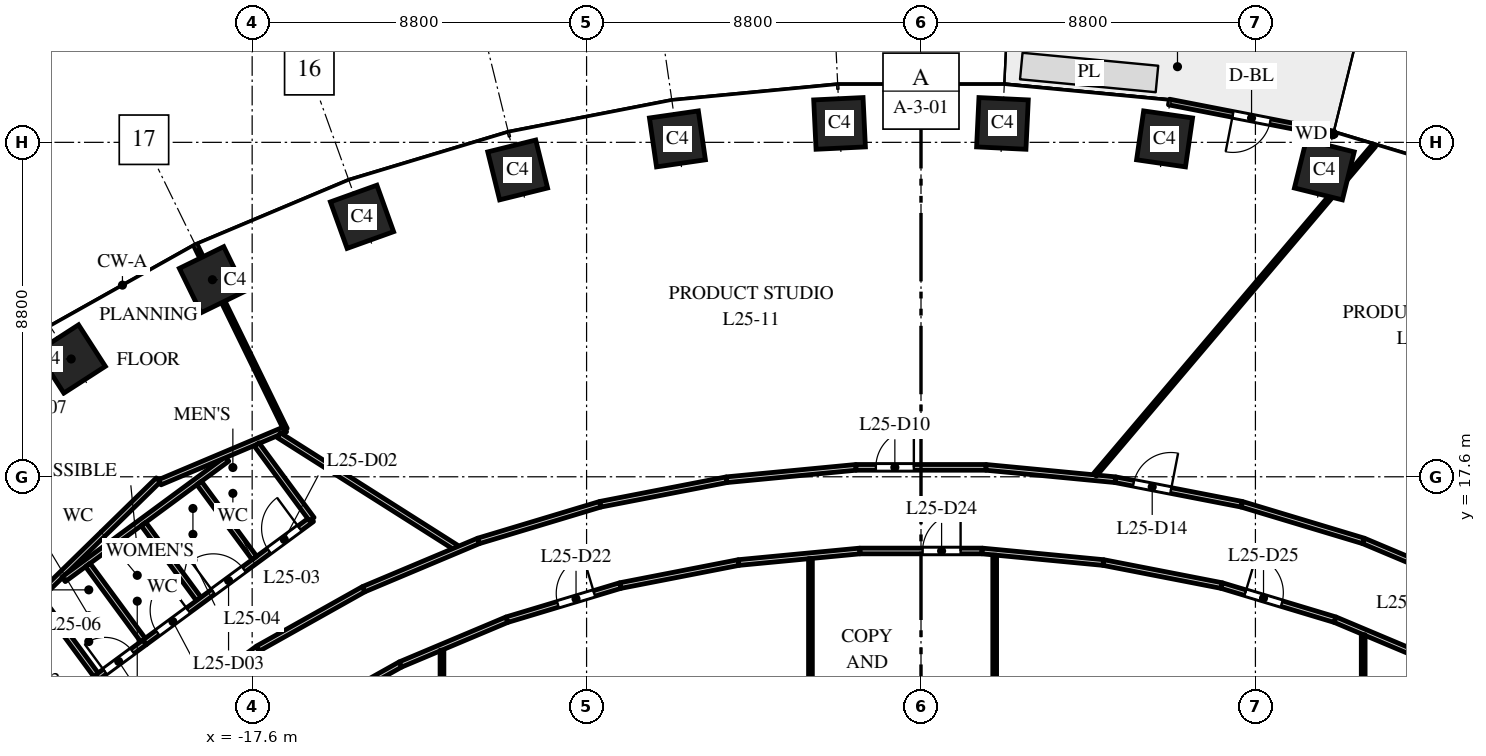
"""IFC4 building model, lengths in metres.
Left out: names, types, materials, properties, quantities, classifications, styles, units other than length and angle.
Written with IfcOpenShell. Run it as: python <this file> out.ifc"""

import sys

from ifc_helpers import new_model, si_unit, direction, frame, frame_2d, origin, origin_2d, place, context, subcontext, project, spatial, rectangle, extrude, element, fill, save


model = new_model("IFC4")
c1 = context("Model", 3, precision=1e-05, world=origin(), true_north=direction((0.0, 1.0)))
c2 = subcontext(c1, "Body", "Model", "MODEL_VIEW")
j1 = project(units=[si_unit("LENGTHUNIT", "METRE"), si_unit("PLANEANGLEUNIT", "RADIAN")], contexts=[c1])
p1 = place(None, origin())
s1 = spatial("IfcSite", under=j1, at=p1, CompositionType="ELEMENT")
p2 = place(p1, origin())
s2 = spatial("IfcBuilding", under=s1, at=p2, CompositionType="ELEMENT")
p3 = place(p2, frame((0.0, 0.0, 112.0)))
s3 = spatial("IfcBuildingStorey", under=s2, at=p3, CompositionType="ELEMENT", Elevation=112.0)
for number, where, z_axis, x_axis in (
    (1, (10.613, 25.674, 0.0), (0.0, 0.0, 1.0), (-0.971, 0.24, 0.0)),
    (2, (6.409, 26.491, 0.0), (0.0, 0.0, 1.0), (-0.99, 0.143, 0.0)),
    (3, (2.143, 26.898, 0.0), (0.0, 0.0, 1.0), (-0.999, 0.048, 0.0)),
    (4, (-2.143, 26.898, 0.0), (0.0, 0.0, 1.0), (-0.999, -0.048, 0.0)),
    (5, (-6.409, 26.491, 0.0), (0.0, 0.0, 1.0), (-0.99, -0.143, 0.0)),
    (6, (-10.613, 25.674, 0.0), (0.0, 0.0, 1.0), (-0.971, -0.24, 0.0)),
    (7, (-14.709, 24.441, 0.0), (0.0, 0.0, 1.0), (-0.941, -0.338, 0.0)),
    (8, (-18.646, 22.785, 0.0), (0.0, 0.0, 1.0), (-0.898, -0.439, 0.0)),
    (9, (-22.362, 20.7, 0.0), (0.0, 0.0, 1.0), (-0.84, -0.542, 0.0)),
):
    element("IfcColumn", number, at=place(p3, frame(where, z_axis=z_axis, x_axis=x_axis)), inside=s3, PredefinedType="COLUMN", context=c2, shape_type="SweptSolid", body=[
        extrude(rectangle(XDim=1.3, YDim=1.3, at=origin_2d()), origin(), (0.0, 0.0, 1.0), 4.0),
    ])
p4 = place(p3, frame((10.871, 26.617, 0.0), z_axis=(0.0, 0.0, 1.0), x_axis=(-0.981631174778, 0.190788460615, 0.0)))
e10 = element("IfcWall", 10, at=p4, inside=s3, PredefinedType="STANDARD", context=c2, shape_type="SweptSolid", body=[
    extrude(rectangle(XDim=4.426, YDim=0.15, at=frame_2d((2.213, 0.0))), origin(), (0.0, 0.0, 1.0), 3.7),
])
p5 = place(p4, frame((1.713, 0.0, 0.0)))
e11 = element("IfcOpeningElement", 11, at=p5, cuts=e10, PredefinedType="OPENING", context=c2, shape_type="SweptSolid", body=[
    extrude(rectangle(XDim=1.0, YDim=2.4, at=frame_2d((0.5, 1.2))), frame((0.0, 0.085, 0.0), z_axis=(0.0, -1.0, 0.0), x_axis=(1.0, 0.0, 0.0)), (0.0, 0.0, 1.0), 0.17),
])
p6 = place(p3, frame((-26.964, 10.777, 0.0), z_axis=(0.0, 0.0, 1.0), x_axis=(0.715000199822, 0.69912424808, 0.0)))
e12 = element("IfcWall", 12, at=p6, inside=s3, PredefinedType="PARTITIONING", context=c2, shape_type="SweptSolid", body=[
    extrude(rectangle(XDim=9.642, YDim=0.15, at=frame_2d((4.821, 0.0))), origin(), (0.0, 0.0, 1.0), 2.75),
])
p7 = place(p3, frame((-23.207, 14.422, 0.0), z_axis=(0.0, 0.0, 1.0), x_axis=(0.592948747936, -0.80524020163, 0.0)))
e13 = element("IfcWall", 13, at=p7, inside=s3, PredefinedType="PARTITIONING", context=c2, shape_type="SweptSolid", body=[
    extrude(rectangle(XDim=2.596, YDim=0.15, at=frame_2d((1.298, 0.0))), origin(), (0.0, 0.0, 1.0), 3.7),
])
p8 = place(p3, frame((-22.562, 14.902, 0.0), z_axis=(0.0, 0.0, 1.0), x_axis=(0.805140814791, 0.593083694227, 0.0)))
e14 = element("IfcWall", 14, at=p8, inside=s3, PredefinedType="PARTITIONING", context=c2, shape_type="SweptSolid", body=[
    extrude(rectangle(XDim=5.343, YDim=0.15, at=frame_2d((2.672, 0.0))), origin(), (0.0, 0.0, 1.0), 2.75),
])
p9 = place(p3, frame((-21.925, 15.279, 0.0), z_axis=(0.0, 0.0, 1.0), x_axis=(0.592783466835, -0.805361882291, 0.0)))
e15 = element("IfcWall", 15, at=p9, inside=s3, PredefinedType="PARTITIONING", context=c2, shape_type="SweptSolid", body=[
    extrude(rectangle(XDim=2.525, YDim=0.15, at=frame_2d((1.263, 0.0))), origin(), (0.0, 0.0, 1.0), 3.7),
])
p10 = place(p3, frame((-21.668, 12.332, 0.0), z_axis=(0.0, 0.0, 1.0), x_axis=(0.805239105185, 0.592950236935, 0.0)))
e16 = element("IfcWall", 16, at=p10, inside=s3, PredefinedType="PARTITIONING", context=c2, shape_type="SweptSolid", body=[
    extrude(rectangle(XDim=1.54, YDim=0.15, at=frame_2d((0.77, 0.0))), origin(), (0.0, 0.0, 1.0), 3.7),
])
p11 = place(p10, frame((0.24, 0.0, 0.0)))
e17 = element("IfcOpeningElement", 17, at=p11, cuts=e16, PredefinedType="OPENING", context=c2, shape_type="SweptSolid", body=[
    extrude(rectangle(XDim=0.9, YDim=2.1, at=frame_2d((0.45, 1.05))), frame((0.0, 0.085, 0.0), z_axis=(0.0, -1.0, 0.0), x_axis=(1.0, 0.0, 0.0)), (0.0, 0.0, 1.0), 0.17),
])
p12 = place(p3, frame((-20.46, 16.358, 0.0), z_axis=(0.0, 0.0, 1.0), x_axis=(0.59304615898, -0.805168462695, 0.0)))
e18 = element("IfcWall", 18, at=p12, inside=s3, PredefinedType="PARTITIONING", context=c2, shape_type="SweptSolid", body=[
    extrude(rectangle(XDim=2.451, YDim=0.15, at=frame_2d((1.226, 0.0))), origin(), (0.0, 0.0, 1.0), 3.7),
])
p13 = place(p3, frame((-20.428, 13.245, 0.0), z_axis=(0.0, 0.0, 1.0), x_axis=(0.80538609279, 0.592750572788, 0.0)))
e19 = element("IfcWall", 19, at=p13, inside=s3, PredefinedType="PARTITIONING", context=c2, shape_type="SweptSolid", body=[
    extrude(rectangle(XDim=5.461, YDim=0.15, at=frame_2d((2.73, 0.0))), origin(), (0.0, 0.0, 1.0), 2.75),
])
p14 = place(p13, frame((4.061, 0.0, 0.0)))
e20 = element("IfcOpeningElement", 20, at=p14, cuts=e19, PredefinedType="OPENING", context=c2, shape_type="SweptSolid", body=[
    extrude(rectangle(XDim=1.0, YDim=2.1, at=frame_2d((0.5, 1.05))), frame((0.0, 0.085, 0.0), z_axis=(0.0, -1.0, 0.0), x_axis=(1.0, 0.0, 0.0)), (0.0, 0.0, 1.0), 0.17),
])
p15 = place(p13, frame((2.24, 0.0, 0.0)))
e21 = element("IfcOpeningElement", 21, at=p15, cuts=e19, PredefinedType="OPENING", context=c2, shape_type="SweptSolid", body=[
    extrude(rectangle(XDim=1.0, YDim=2.1, at=frame_2d((0.5, 1.05))), frame((0.0, 0.085, 0.0), z_axis=(0.0, -1.0, 0.0), x_axis=(1.0, 0.0, 0.0)), (0.0, 0.0, 1.0), 0.17),
])
p16 = place(p13, frame((0.42, 0.0, 0.0)))
e22 = element("IfcOpeningElement", 22, at=p16, cuts=e19, PredefinedType="OPENING", context=c2, shape_type="SweptSolid", body=[
    extrude(rectangle(XDim=1.0, YDim=2.1, at=frame_2d((0.5, 1.05))), frame((0.0, 0.085, 0.0), z_axis=(0.0, -1.0, 0.0), x_axis=(1.0, 0.0, 0.0)), (0.0, 0.0, 1.0), 0.17),
])
p17 = place(p3, frame((-20.028, 17.457, 0.0), z_axis=(0.0, 0.0, 1.0), x_axis=(0.921396911144, 0.388622866201, 0.0)))
e23 = element("IfcWall", 23, at=p17, inside=s3, PredefinedType="PARTITIONING", context=c2, shape_type="SweptSolid", body=[
    extrude(rectangle(XDim=3.587, YDim=0.15, at=frame_2d((1.793, 0.0))), origin(), (0.0, 0.0, 1.0), 3.7),
])
p18 = place(p3, frame((-19.919, 11.26, 0.0), z_axis=(0.0, 0.0, 1.0), x_axis=(0.805185638843, 0.593022838516, 0.0)))
e24 = element("IfcWall", 24, at=p18, inside=s3, PredefinedType="PARTITIONING", context=c2, shape_type="SweptSolid", body=[
    extrude(rectangle(XDim=3.073, YDim=0.15, at=frame_2d((1.536, 0.0))), origin(), (0.0, 0.0, 1.0), 2.75),
])
p19 = place(p3, frame((-19.086, 23.685, 0.0), z_axis=(0.0, 0.0, 1.0), x_axis=(0.439173510656, -0.898402263765, 0.0)))
e25 = element("IfcWall", 25, at=p19, inside=s3, PredefinedType="PARTITIONING", context=c2, shape_type="SweptSolid", body=[
    extrude(rectangle(XDim=5.381, YDim=0.1, at=frame_2d((2.69, 0.0))), origin(), (0.0, 0.0, 1.0), 3.7),
])
p20 = place(p3, frame((-18.995, 17.437, 0.0), z_axis=(0.0, 0.0, 1.0), x_axis=(0.593300972215, -0.80498071801, 0.0)))
e26 = element("IfcWall", 26, at=p20, inside=s3, PredefinedType="PARTITIONING", context=c2, shape_type="SweptSolid", body=[
    extrude(rectangle(XDim=2.451, YDim=0.15, at=frame_2d((1.226, 0.0))), origin(), (0.0, 0.0, 1.0), 3.7),
])
p21 = place(p3, frame((-17.48, 18.449, 0.0), z_axis=(0.0, 0.0, 1.0), x_axis=(0.593277461832, -0.804998045515, 0.0)))
e27 = element("IfcWall", 27, at=p21, inside=s3, PredefinedType="PARTITIONING", context=c2, shape_type="SweptSolid", body=[
    extrude(rectangle(XDim=2.442, YDim=0.15, at=frame_2d((1.221, 0.0))), origin(), (0.0, 0.0, 1.0), 3.7),
])
p22 = place(p3, frame((-17.445, 13.082, 0.0), z_axis=(0.0, 0.0, 1.0), x_axis=(0.872072095629, 0.489377420837, 0.0)))
e28 = element("IfcWall", 28, at=p22, inside=s3, PredefinedType="PARTITIONING", context=c2, shape_type="SweptSolid", body=[
    extrude(rectangle(XDim=3.188, YDim=0.15, at=frame_2d((1.594, 0.0))), origin(), (0.0, 0.0, 1.0), 3.7),
])
p23 = place(p3, frame((-16.899, 18.695, 0.0), z_axis=(0.0, 0.0, 1.0), x_axis=(0.844493920995, -0.535565138337, 0.0)))
e29 = element("IfcWall", 29, at=p23, inside=s3, PredefinedType="PARTITIONING", context=c2, shape_type="SweptSolid", body=[
    extrude(rectangle(XDim=5.512, YDim=0.15, at=frame_2d((2.756, 0.0))), origin(), (0.0, 0.0, 1.0), 2.85),
])
p24 = place(p3, frame((-16.25, 11.23, 0.0), z_axis=(0.0, 0.0, 1.0), x_axis=(0.872147381065, 0.489243237767, 0.0)))
e30 = element("IfcWall", 30, at=p24, inside=s3, PredefinedType="PARTITIONING", context=c2, shape_type="SweptSolid", body=[
    extrude(rectangle(XDim=2.927, YDim=0.15, at=frame_2d((1.464, 0.0))), origin(), (0.0, 0.0, 1.0), 2.75),
])
p25 = place(p3, frame((-14.665, 14.642, 0.0), z_axis=(0.0, 0.0, 1.0), x_axis=(0.921789499058, 0.38769075231, 0.0)))
e31 = element("IfcWall", 31, at=p25, inside=s3, PredefinedType="PARTITIONING", context=c2, shape_type="SweptSolid", body=[
    extrude(rectangle(XDim=3.278, YDim=0.15, at=frame_2d((1.639, 0.0))), origin(), (0.0, 0.0, 1.0), 2.85),
])
p26 = place(p3, frame((-13.697, 12.662, 0.0), z_axis=(0.0, 0.0, 1.0), x_axis=(0.921751821358, 0.387780324183, 0.0)))
e32 = element("IfcWall", 32, at=p26, inside=s3, PredefinedType="PARTITIONING", context=c2, shape_type="SweptSolid", body=[
    extrude(rectangle(XDim=3.038, YDim=0.15, at=frame_2d((1.519, 0.0))), origin(), (0.0, 0.0, 1.0), 2.85),
])
p27 = place(p3, frame((-12.605, -13.036, 0.0), z_axis=(0.0, 0.0, 1.0), x_axis=(0.0, 1.0, 0.0)))
e33 = element("IfcWall", 33, at=p27, inside=s3, PredefinedType="PARTITIONING", context=c2, shape_type="SweptSolid", body=[
    extrude(rectangle(XDim=26.072, YDim=0.1, at=frame_2d((13.036, 0.0))), origin(), (0.0, 0.0, 1.0), 2.75),
])
p28 = place(p3, frame((-11.643, 15.913, 0.0), z_axis=(0.0, 0.0, 1.0), x_axis=(0.957584891346, 0.288151307243, 0.0)))
e34 = element("IfcWall", 34, at=p28, inside=s3, PredefinedType="PARTITIONING", context=c2, shape_type="SweptSolid", body=[
    extrude(rectangle(XDim=3.345, YDim=0.15, at=frame_2d((1.672, 0.0))), origin(), (0.0, 0.0, 1.0), 3.7),
])
p29 = place(p3, frame((-10.897, 13.84, 0.0), z_axis=(0.0, 0.0, 1.0), x_axis=(0.957606118849, 0.28808075455, 0.0)))
e35 = element("IfcWall", 35, at=p29, inside=s3, PredefinedType="PARTITIONING", context=c2, shape_type="SweptSolid", body=[
    extrude(rectangle(XDim=3.117, YDim=0.15, at=frame_2d((1.559, 0.0))), origin(), (0.0, 0.0, 1.0), 3.7),
])
p30 = place(p29, frame((1.4, 0.0, 0.0)))
e36 = element("IfcOpeningElement", 36, at=p30, cuts=e35, PredefinedType="OPENING", context=c2, shape_type="SweptSolid", body=[
    extrude(rectangle(XDim=1.0, YDim=2.1, at=frame_2d((0.5, 1.05))), frame((0.0, 0.085, 0.0), z_axis=(0.0, -1.0, 0.0), x_axis=(1.0, 0.0, 0.0)), (0.0, 0.0, 1.0), 0.17),
])
p31 = place(p3, frame((-8.44, 16.877, 0.0), z_axis=(0.0, 0.0, 1.0), x_axis=(0.981665220565, 0.190613207134, 0.0)))
e37 = element("IfcWall", 37, at=p31, inside=s3, PredefinedType="PARTITIONING", context=c2, shape_type="SweptSolid", body=[
    extrude(rectangle(XDim=3.389, YDim=0.15, at=frame_2d((1.695, 0.0))), origin(), (0.0, 0.0, 1.0), 2.85),
])
p32 = place(p3, frame((-7.912, 14.738, 0.0), z_axis=(0.0, 0.0, 1.0), x_axis=(0.981588545092, 0.191007665145, 0.0)))
e38 = element("IfcWall", 38, at=p32, inside=s3, PredefinedType="PARTITIONING", context=c2, shape_type="SweptSolid", body=[
    extrude(rectangle(XDim=3.172, YDim=0.15, at=frame_2d((1.586, 0.0))), origin(), (0.0, 0.0, 1.0), 2.85),
])
p33 = place(p3, frame((-5.113, 17.523, 0.0), z_axis=(0.0, 0.0, 1.0), x_axis=(0.995466844572, 0.095109207532, 0.0)))
e39 = element("IfcWall", 39, at=p33, inside=s3, PredefinedType="PARTITIONING", context=c2, shape_type="SweptSolid", body=[
    extrude(rectangle(XDim=3.417, YDim=0.15, at=frame_2d((1.708, 0.0))), origin(), (0.0, 0.0, 1.0), 3.7),
])
p34 = place(p3, frame((-4.798, 15.344, 0.0), z_axis=(0.0, 0.0, 1.0), x_axis=(0.995491705426, 0.09484863957, 0.0)))
e40 = element("IfcWall", 40, at=p34, inside=s3, PredefinedType="PARTITIONING", context=c2, shape_type="SweptSolid", body=[
    extrude(rectangle(XDim=3.205, YDim=0.15, at=frame_2d((1.602, 0.0))), origin(), (0.0, 0.0, 1.0), 3.7),
])
p35 = place(p3, frame((-2.909, 7.082, 0.0), z_axis=(0.0, 0.0, 1.0), x_axis=(0.0, 1.0, 0.0)))
e41 = element("IfcWall", 41, at=p35, inside=s3, PredefinedType="PARTITIONING", context=c2, shape_type="SweptSolid", body=[
    extrude(rectangle(XDim=8.363, YDim=0.1, at=frame_2d((4.182, 0.0))), origin(), (0.0, 0.0, 1.0), 2.9),
])
p36 = place(p3, frame((-1.712, 17.848, 0.0), z_axis=(0.0, 0.0, 1.0), x_axis=(1.0, 0.0, 0.0)))
e42 = element("IfcWall", 42, at=p36, inside=s3, PredefinedType="PARTITIONING", context=c2, shape_type="SweptSolid", body=[
    extrude(rectangle(XDim=3.424, YDim=0.15, at=frame_2d((1.712, 0.0))), origin(), (0.0, 0.0, 1.0), 2.85),
])
p37 = place(p36, frame((0.524, 0.0, 0.0)))
e43 = element("IfcOpeningElement", 43, at=p37, cuts=e42, PredefinedType="OPENING", context=c2, shape_type="SweptSolid", body=[
    extrude(rectangle(XDim=1.0, YDim=2.1, at=frame_2d((0.5, 1.05))), frame((0.0, 0.085, 0.0), z_axis=(0.0, -1.0, 0.0), x_axis=(1.0, 0.0, 0.0)), (0.0, 0.0, 1.0), 0.17),
])
p38 = place(p3, frame((-1.608, 15.648, 0.0), z_axis=(0.0, 0.0, 1.0), x_axis=(1.0, 0.0, 0.0)))
e44 = element("IfcWall", 44, at=p38, inside=s3, PredefinedType="PARTITIONING", context=c2, shape_type="SweptSolid", body=[
    extrude(rectangle(XDim=3.216, YDim=0.15, at=frame_2d((1.608, 0.0))), origin(), (0.0, 0.0, 1.0), 2.85),
])
p39 = place(p38, frame((1.65, 0.0, 0.0)))
e45 = element("IfcOpeningElement", 45, at=p39, cuts=e44, PredefinedType="OPENING", context=c2, shape_type="SweptSolid", body=[
    extrude(rectangle(XDim=1.0, YDim=2.1, at=frame_2d((0.5, 1.05))), frame((0.0, 0.085, 0.0), z_axis=(0.0, -1.0, 0.0), x_axis=(1.0, 0.0, 0.0)), (0.0, 0.0, 1.0), 0.17),
])
p40 = place(p3, frame((1.608, 15.648, 0.0), z_axis=(0.0, 0.0, 1.0), x_axis=(0.995491705426, -0.09484863957, 0.0)))
e46 = element("IfcWall", 46, at=p40, inside=s3, PredefinedType="PARTITIONING", context=c2, shape_type="SweptSolid", body=[
    extrude(rectangle(XDim=3.205, YDim=0.15, at=frame_2d((1.602, 0.0))), origin(), (0.0, 0.0, 1.0), 2.85),
])
p41 = place(p3, frame((1.712, 17.848, 0.0), z_axis=(0.0, 0.0, 1.0), x_axis=(0.995466844572, -0.095109207532, 0.0)))
e47 = element("IfcWall", 47, at=p41, inside=s3, PredefinedType="PARTITIONING", context=c2, shape_type="SweptSolid", body=[
    extrude(rectangle(XDim=3.417, YDim=0.15, at=frame_2d((1.708, 0.0))), origin(), (0.0, 0.0, 1.0), 2.85),
])
p42 = place(p3, frame((1.939, 7.307, 0.0), z_axis=(0.0, 0.0, 1.0), x_axis=(0.0, 1.0, 0.0)))
e48 = element("IfcWall", 48, at=p42, inside=s3, PredefinedType="PARTITIONING", context=c2, shape_type="SweptSolid", body=[
    extrude(rectangle(XDim=8.23, YDim=0.1, at=frame_2d((4.115, 0.0))), origin(), (0.0, 0.0, 1.0), 2.85),
])
p43 = place(p3, frame((4.576, 17.651, 0.0), z_axis=(0.0, 0.0, 1.0), x_axis=(0.646514915662, 0.762901346064, 0.0)))
e49 = element("IfcWall", 49, at=p43, inside=s3, PredefinedType="PARTITIONING", context=c2, shape_type="SweptSolid", body=[
    extrude(rectangle(XDim=11.367, YDim=0.1, at=frame_2d((5.684, 0.0))), origin(), (0.0, 0.0, 1.0), 2.9),
])
p44 = place(p3, frame((4.798, 15.344, 0.0), z_axis=(0.0, 0.0, 1.0), x_axis=(0.981588545092, -0.191007665145, 0.0)))
e50 = element("IfcWall", 50, at=p44, inside=s3, PredefinedType="PARTITIONING", context=c2, shape_type="SweptSolid", body=[
    extrude(rectangle(XDim=3.172, YDim=0.15, at=frame_2d((1.586, 0.0))), origin(), (0.0, 0.0, 1.0), 3.7),
])
p45 = place(p3, frame((5.113, 17.523, 0.0), z_axis=(0.0, 0.0, 1.0), x_axis=(0.981665220565, -0.190613207134, 0.0)))
e51 = element("IfcWall", 51, at=p45, inside=s3, PredefinedType="PARTITIONING", context=c2, shape_type="SweptSolid", body=[
    extrude(rectangle(XDim=3.389, YDim=0.15, at=frame_2d((1.695, 0.0))), origin(), (0.0, 0.0, 1.0), 3.7),
])
p46 = place(p45, frame((0.489, 0.0, 0.0)))
e52 = element("IfcOpeningElement", 52, at=p46, cuts=e51, PredefinedType="OPENING", context=c2, shape_type="SweptSolid", body=[
    extrude(rectangle(XDim=1.0, YDim=2.1, at=frame_2d((0.5, 1.05))), frame((0.0, 0.085, 0.0), z_axis=(0.0, -1.0, 0.0), x_axis=(1.0, 0.0, 0.0)), (0.0, 0.0, 1.0), 0.17),
])
p47 = place(p3, frame((7.912, 14.738, 0.0), z_axis=(0.0, 0.0, 1.0), x_axis=(0.957606118849, -0.28808075455, 0.0)))
e53 = element("IfcWall", 53, at=p47, inside=s3, PredefinedType="PARTITIONING", context=c2, shape_type="SweptSolid", body=[
    extrude(rectangle(XDim=3.117, YDim=0.15, at=frame_2d((1.559, 0.0))), origin(), (0.0, 0.0, 1.0), 2.85),
])
p48 = place(p47, frame((0.65, 0.0, 0.0)))
e54 = element("IfcOpeningElement", 54, at=p48, cuts=e53, PredefinedType="OPENING", context=c2, shape_type="SweptSolid", body=[
    extrude(rectangle(XDim=1.0, YDim=2.1, at=frame_2d((0.5, 1.05))), frame((0.0, 0.085, 0.0), z_axis=(0.0, -1.0, 0.0), x_axis=(1.0, 0.0, 0.0)), (0.0, 0.0, 1.0), 0.17),
])
p49 = place(p3, frame((8.44, 16.877, 0.0), z_axis=(0.0, 0.0, 1.0), x_axis=(0.957584891346, -0.288151307243, 0.0)))
e55 = element("IfcWall", 55, at=p49, inside=s3, PredefinedType="PARTITIONING", context=c2, shape_type="SweptSolid", body=[
    extrude(rectangle(XDim=3.345, YDim=0.15, at=frame_2d((1.672, 0.0))), origin(), (0.0, 0.0, 1.0), 2.85),
])
p50 = place(p3, frame((10.897, 13.84, 0.0), z_axis=(0.0, 0.0, 1.0), x_axis=(0.921751821358, -0.387780324183, 0.0)))
e56 = element("IfcWall", 56, at=p50, inside=s3, PredefinedType="PARTITIONING", context=c2, shape_type="SweptSolid", body=[
    extrude(rectangle(XDim=3.038, YDim=0.15, at=frame_2d((1.519, 0.0))), origin(), (0.0, 0.0, 1.0), 3.7),
])
p51 = place(p3, frame((11.636, -13.444, 0.0), z_axis=(0.0, 0.0, 1.0), x_axis=(0.0, 1.0, 0.0)))
e57 = element("IfcWall", 57, at=p51, inside=s3, PredefinedType="PARTITIONING", context=c2, shape_type="SweptSolid", body=[
    extrude(rectangle(XDim=26.888, YDim=0.1, at=frame_2d((13.444, 0.0))), origin(), (0.0, 0.0, 1.0), 2.75),
])
p52 = place(p3, frame((11.643, 15.913, 0.0), z_axis=(0.0, 0.0, 1.0), x_axis=(0.921789499058, -0.38769075231, 0.0)))
e58 = element("IfcWall", 58, at=p52, inside=s3, PredefinedType="PARTITIONING", context=c2, shape_type="SweptSolid", body=[
    extrude(rectangle(XDim=3.278, YDim=0.15, at=frame_2d((1.639, 0.0))), origin(), (0.0, 0.0, 1.0), 3.7),
])
p53 = place(p5, origin())
e59 = element("IfcDoor", 59, at=p53, inside=s3, OperationType="SINGLE_SWING_RIGHT", PredefinedType="DOOR", context=c2, shape_type="SweptSolid", body=[
    extrude(rectangle(XDim=1.0, YDim=2.4, at=frame_2d((0.5, 1.2))), frame((0.0, 0.025, 0.0), z_axis=(0.0, -1.0, 0.0), x_axis=(1.0, 0.0, 0.0)), (0.0, 0.0, 1.0), 0.05),
])
fill(e11, e59)
p54 = place(p14, origin())
e60 = element("IfcDoor", 60, at=p54, inside=s3, OperationType="SINGLE_SWING_RIGHT", PredefinedType="DOOR", context=c2, shape_type="SweptSolid", body=[
    extrude(rectangle(XDim=1.0, YDim=2.1, at=frame_2d((0.5, 1.05))), frame((0.0, 0.025, 0.0), z_axis=(0.0, -1.0, 0.0), x_axis=(1.0, 0.0, 0.0)), (0.0, 0.0, 1.0), 0.05),
])
fill(e20, e60)
p55 = place(p15, origin())
e61 = element("IfcDoor", 61, at=p55, inside=s3, OperationType="SINGLE_SWING_LEFT", PredefinedType="DOOR", context=c2, shape_type="SweptSolid", body=[
    extrude(rectangle(XDim=1.0, YDim=2.1, at=frame_2d((0.5, 1.05))), frame((0.0, 0.025, 0.0), z_axis=(0.0, -1.0, 0.0), x_axis=(1.0, 0.0, 0.0)), (0.0, 0.0, 1.0), 0.05),
])
fill(e21, e61)
p56 = place(p16, origin())
e62 = element("IfcDoor", 62, at=p56, inside=s3, OperationType="SINGLE_SWING_RIGHT", PredefinedType="DOOR", context=c2, shape_type="SweptSolid", body=[
    extrude(rectangle(XDim=1.0, YDim=2.1, at=frame_2d((0.5, 1.05))), frame((0.0, 0.025, 0.0), z_axis=(0.0, -1.0, 0.0), x_axis=(1.0, 0.0, 0.0)), (0.0, 0.0, 1.0), 0.05),
])
fill(e22, e62)
p57 = place(p11, origin())
e63 = element("IfcDoor", 63, at=p57, inside=s3, OperationType="SINGLE_SWING_LEFT", PredefinedType="DOOR", context=c2, shape_type="SweptSolid", body=[
    extrude(rectangle(XDim=0.9, YDim=2.1, at=frame_2d((0.45, 1.05))), frame((0.0, 0.025, 0.0), z_axis=(0.0, -1.0, 0.0), x_axis=(1.0, 0.0, 0.0)), (0.0, 0.0, 1.0), 0.05),
])
fill(e17, e63)
p58 = place(p37, origin())
e64 = element("IfcDoor", 64, at=p58, inside=s3, OperationType="SINGLE_SWING_RIGHT", PredefinedType="DOOR", context=c2, shape_type="SweptSolid", body=[
    extrude(rectangle(XDim=1.0, YDim=2.1, at=frame_2d((0.5, 1.05))), frame((0.0, 0.025, 0.0), z_axis=(0.0, -1.0, 0.0), x_axis=(1.0, 0.0, 0.0)), (0.0, 0.0, 1.0), 0.05),
])
fill(e43, e64)
p59 = place(p46, origin())
e65 = element("IfcDoor", 65, at=p59, inside=s3, OperationType="SINGLE_SWING_RIGHT", PredefinedType="DOOR", context=c2, shape_type="SweptSolid", body=[
    extrude(rectangle(XDim=1.0, YDim=2.1, at=frame_2d((0.5, 1.05))), frame((0.0, 0.025, 0.0), z_axis=(0.0, -1.0, 0.0), x_axis=(1.0, 0.0, 0.0)), (0.0, 0.0, 1.0), 0.05),
])
fill(e52, e65)
p60 = place(p30, origin())
e66 = element("IfcDoor", 66, at=p60, inside=s3, OperationType="SINGLE_SWING_RIGHT", PredefinedType="DOOR", context=c2, shape_type="SweptSolid", body=[
    extrude(rectangle(XDim=1.0, YDim=2.1, at=frame_2d((0.5, 1.05))), frame((0.0, 0.025, 0.0), z_axis=(0.0, -1.0, 0.0), x_axis=(1.0, 0.0, 0.0)), (0.0, 0.0, 1.0), 0.05),
])
fill(e36, e66)
p61 = place(p39, origin())
e67 = element("IfcDoor", 67, at=p61, inside=s3, OperationType="SINGLE_SWING_RIGHT", PredefinedType="DOOR", context=c2, shape_type="SweptSolid", body=[
    extrude(rectangle(XDim=1.0, YDim=2.1, at=frame_2d((0.5, 1.05))), frame((0.0, 0.025, 0.0), z_axis=(0.0, -1.0, 0.0), x_axis=(1.0, 0.0, 0.0)), (0.0, 0.0, 1.0), 0.05),
])
fill(e45, e67)
p62 = place(p48, origin())
e68 = element("IfcDoor", 68, at=p62, inside=s3, OperationType="SINGLE_SWING_LEFT", PredefinedType="DOOR", context=c2, shape_type="SweptSolid", body=[
    extrude(rectangle(XDim=1.0, YDim=2.1, at=frame_2d((0.5, 1.05))), frame((0.0, 0.025, 0.0), z_axis=(0.0, -1.0, 0.0), x_axis=(1.0, 0.0, 0.0)), (0.0, 0.0, 1.0), 0.05),
])
fill(e54, e68)
save(model, sys.argv[1])
